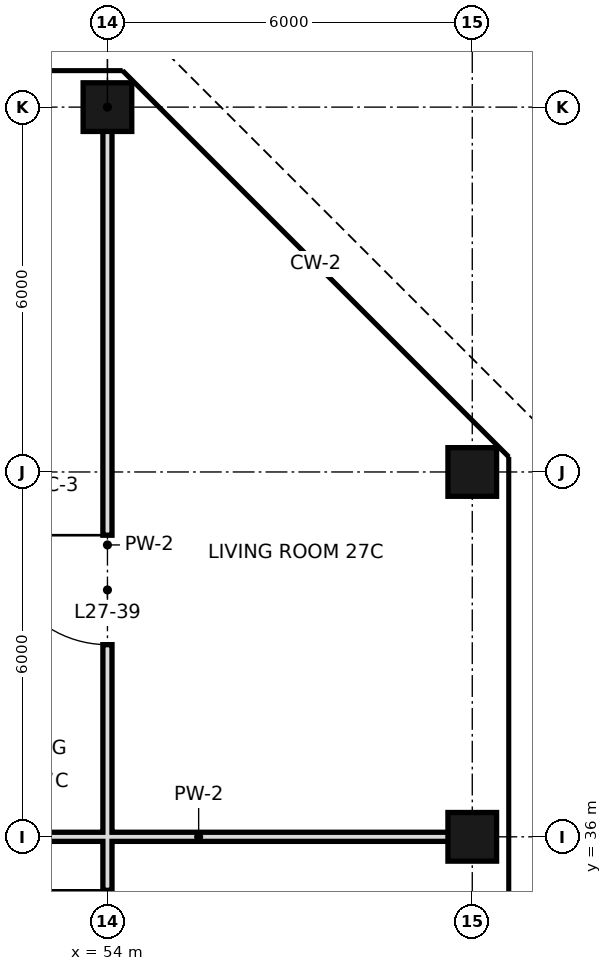
"""IFC4 building model, lengths in metres.
Left out: names, types, materials, properties, quantities, classifications, styles, units other than length and angle.
Written with IfcOpenShell. Run it as: python <this file> out.ifc"""

import sys

from ifc_helpers import new_model, si_unit, direction, frame, frame_2d, origin, origin_2d, place, context, subcontext, project, spatial, rectangle, hollow_rectangle, extrude, element, fill, save


model = new_model("IFC4")
c1 = context("Model", 3, precision=1e-05, world=origin(), true_north=direction((0.0, 1.0)))
c2 = subcontext(c1, "Body", "Model", "MODEL_VIEW")
j1 = project(units=[si_unit("LENGTHUNIT", "METRE"), si_unit("PLANEANGLEUNIT", "RADIAN")], contexts=[c1])
p1 = place(None, origin())
s1 = spatial("IfcSite", under=j1, at=p1, CompositionType="ELEMENT")
p2 = place(p1, origin())
s2 = spatial("IfcBuilding", under=s1, at=p2, CompositionType="ELEMENT")
p3 = place(p2, frame((0.0, 0.0, 123.2)))
s3 = spatial("IfcBuildingStorey", under=s2, at=p3, CompositionType="ELEMENT", Elevation=123.2)
for number, where, z_axis, x_axis in (
    (1, (54.0, 48.0, 0.0), (0.0, 0.0, 1.0), (1.0, 0.0, 0.0)),
    (2, (60.0, 36.0, 0.0), (0.0, 0.0, 1.0), (1.0, 0.0, 0.0)),
    (3, (60.0, 42.0, 0.0), (0.0, 0.0, 1.0), (1.0, 0.0, 0.0)),
):
    element("IfcColumn", number, at=place(p3, frame(where, z_axis=z_axis, x_axis=x_axis)), inside=s3, PredefinedType="COLUMN", context=c2, shape_type="SweptSolid", body=[
        extrude(hollow_rectangle(XDim=0.8, YDim=0.8, WallThickness=0.04, at=origin_2d()), origin(), (0.0, 0.0, 1.0), 3.6),
    ])
p4 = place(p3, frame((54.0, 33.6, 0.0), z_axis=(0.0, 0.0, 1.0), x_axis=(0.0, 1.0, 0.0)))
e4 = element("IfcWall", 4, at=p4, inside=s3, PredefinedType="PARTITIONING", context=c2, shape_type="SweptSolid", body=[
    extrude(rectangle(XDim=14.4, YDim=0.15, at=frame_2d((7.2, 0.0))), origin(), (0.0, 0.0, 1.0), 3.42),
])
p5 = place(p4, frame((0.52, 0.0, 0.0)))
e5 = element("IfcOpeningElement", 5, at=p5, cuts=e4, PredefinedType="OPENING", context=c2, shape_type="SweptSolid", body=[
    extrude(rectangle(XDim=1.0, YDim=2.4, at=frame_2d((0.5, 1.2))), frame((0.0, 0.085, 0.0), z_axis=(0.0, -1.0, 0.0), x_axis=(1.0, 0.0, 0.0)), (0.0, 0.0, 1.0), 0.17),
])
p6 = place(p4, frame((5.56, 0.0, 0.0)))
e6 = element("IfcOpeningElement", 6, at=p6, cuts=e4, PredefinedType="OPENING", context=c2, shape_type="SweptSolid", body=[
    extrude(rectangle(XDim=1.8, YDim=2.4, at=frame_2d((0.9, 1.2))), frame((0.0, 0.085, 0.0), z_axis=(0.0, -1.0, 0.0), x_axis=(1.0, 0.0, 0.0)), (0.0, 0.0, 1.0), 0.17),
])
p7 = place(p3, frame((51.0, 36.0, 0.0), z_axis=(0.0, 0.0, 1.0), x_axis=(1.0, 0.0, 0.0)))
e7 = element("IfcWall", 7, at=p7, inside=s3, PredefinedType="PARTITIONING", context=c2, shape_type="SweptSolid", body=[
    extrude(rectangle(XDim=9.0, YDim=0.15, at=frame_2d((4.5, 0.0))), origin(), (0.0, 0.0, 1.0), 2.72),
])
p8 = place(p5, frame((1.0, 0.0, 0.0), z_axis=(0.0, 0.0, 1.0), x_axis=(-1.0, 0.0, 0.0)))
e8 = element("IfcDoor", 8, at=p8, inside=s3, OperationType="SINGLE_SWING_LEFT", PredefinedType="DOOR", context=c2, shape_type="SweptSolid", body=[
    extrude(rectangle(XDim=1.0, YDim=2.4, at=frame_2d((0.5, 1.2))), frame((0.0, 0.025, 0.0), z_axis=(0.0, -1.0, 0.0), x_axis=(1.0, 0.0, 0.0)), (0.0, 0.0, 1.0), 0.05),
])
fill(e5, e8)
p9 = place(p6, frame((1.8, 0.0, 0.0), z_axis=(0.0, 0.0, 1.0), x_axis=(-1.0, 0.0, 0.0)))
e9 = element("IfcDoor", 9, at=p9, inside=s3, OperationType="SINGLE_SWING_LEFT", PredefinedType="DOOR", context=c2, shape_type="SweptSolid", body=[
    extrude(rectangle(XDim=1.8, YDim=2.4, at=frame_2d((0.9, 1.2))), frame((0.0, 0.025, 0.0), z_axis=(0.0, -1.0, 0.0), x_axis=(1.0, 0.0, 0.0)), (0.0, 0.0, 1.0), 0.05),
])
fill(e6, e9)
save(model, sys.argv[1])
